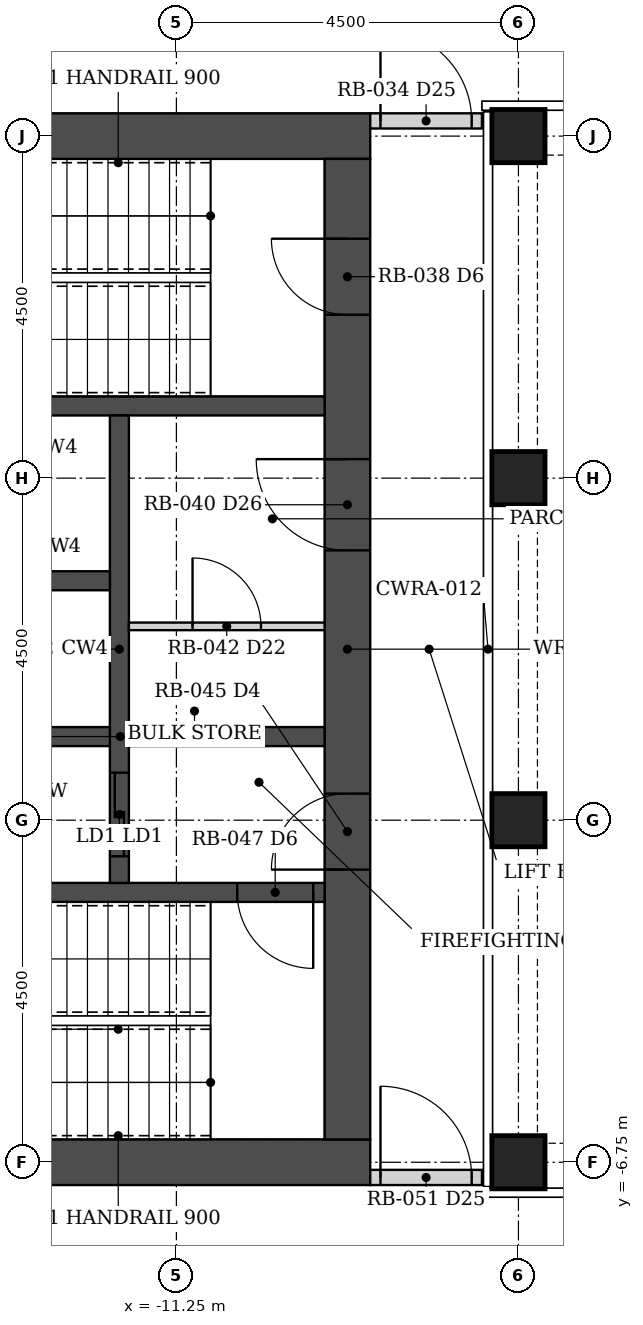
"""IFC4 building model, lengths in metres.
Left out: names, types, materials, properties, quantities, classifications, styles, units other than length and angle.
Written with IfcOpenShell. Run it as: python <this file> out.ifc"""

import sys

from ifc_helpers import new_model, si_unit, direction, frame, frame_2d, origin, origin_2d, place, context, subcontext, project, spatial, rectangle, hollow_rectangle, extrude, element, fill, save


model = new_model("IFC4")
c1 = context("Model", 3, precision=1e-05, world=origin(), true_north=direction((0.0, 1.0)))
c2 = subcontext(c1, "Body", "Model", "MODEL_VIEW")
j1 = project(units=[si_unit("LENGTHUNIT", "METRE"), si_unit("PLANEANGLEUNIT", "RADIAN")], contexts=[c1])
p1 = place(None, origin())
s1 = spatial("IfcSite", under=j1, at=p1, CompositionType="ELEMENT")
p2 = place(p1, origin())
s2 = spatial("IfcBuilding", under=s1, at=p2, CompositionType="ELEMENT")
p3 = place(p2, frame((0.0, 0.0, 37.0)))
s3 = spatial("IfcBuildingStorey", under=s2, at=p3, CompositionType="ELEMENT", Elevation=37.0)
for number, where, z_axis, x_axis in (
    (1, (-6.75, -6.75, 0.0), (0.0, 0.0, 1.0), (1.0, 0.0, 0.0)),
    (2, (-6.75, -2.25, 0.0), (0.0, 0.0, 1.0), (1.0, 0.0, 0.0)),
    (3, (-6.75, 2.25, 0.0), (0.0, 0.0, 1.0), (1.0, 0.0, 0.0)),
    (4, (-6.75, 6.75, 0.0), (0.0, 0.0, 1.0), (1.0, 0.0, 0.0)),
):
    element("IfcColumn", number, at=place(p3, frame(where, z_axis=z_axis, x_axis=x_axis)), inside=s3, PredefinedType="COLUMN", context=c2, shape_type="SweptSolid", body=[
        extrude(hollow_rectangle(XDim=0.7, YDim=0.7, WallThickness=0.07, at=origin_2d()), origin(), (0.0, 0.0, 1.0), 3.5),
    ])
for number, where, z_axis, x_axis in (
    (5, (-8.7, -6.75, 0.0), (0.0, 0.0, 1.0), (-1.0, 0.0, 0.0)),
    (6, (-8.7, 6.75, 0.0), (0.0, 0.0, 1.0), (-1.0, 0.0, 0.0)),
):
    element("IfcWall", number, at=place(p3, frame(where, z_axis=z_axis, x_axis=x_axis)), inside=s3, PredefinedType="SHEAR", context=c2, shape_type="SweptSolid", body=[
        extrude(rectangle(XDim=9.6, YDim=0.6, at=frame_2d((4.8, 0.0))), origin(), (0.0, 0.0, 1.0), 3.5),
    ])
p4 = place(p3, frame((-9.0, -6.45, 0.0), z_axis=(0.0, 0.0, 1.0), x_axis=(0.0, 1.0, 0.0)))
e7 = element("IfcWall", 7, at=p4, inside=s3, PredefinedType="SHEAR", context=c2, shape_type="SweptSolid", body=[
    extrude(rectangle(XDim=12.9, YDim=0.6, at=frame_2d((6.45, 0.0))), origin(), (0.0, 0.0, 1.0), 3.5),
])
p5 = place(p4, frame((3.55, 0.0, 0.0)))
e8 = element("IfcOpeningElement", 8, at=p5, cuts=e7, PredefinedType="OPENING", context=c2, shape_type="SweptSolid", body=[
    extrude(rectangle(XDim=1.0, YDim=2.1, at=frame_2d((0.5, 1.05))), frame((0.0, 0.31, 0.0), z_axis=(0.0, -1.0, 0.0), x_axis=(1.0, 0.0, 0.0)), (0.0, 0.0, 1.0), 0.62),
])
p6 = place(p4, frame((7.75, 0.0, 0.0)))
e9 = element("IfcOpeningElement", 9, at=p6, cuts=e7, PredefinedType="OPENING", context=c2, shape_type="SweptSolid", body=[
    extrude(rectangle(XDim=1.2, YDim=2.1, at=frame_2d((0.6, 1.05))), frame((0.0, 0.31, 0.0), z_axis=(0.0, -1.0, 0.0), x_axis=(1.0, 0.0, 0.0)), (0.0, 0.0, 1.0), 0.62),
])
p7 = place(p4, frame((10.85, 0.0, 0.0)))
e10 = element("IfcOpeningElement", 10, at=p7, cuts=e7, PredefinedType="OPENING", context=c2, shape_type="SweptSolid", body=[
    extrude(rectangle(XDim=1.0, YDim=2.1, at=frame_2d((0.5, 1.05))), frame((0.0, 0.31, 0.0), z_axis=(0.0, -1.0, 0.0), x_axis=(1.0, 0.0, 0.0)), (0.0, 0.0, 1.0), 0.62),
])
p8 = place(p3, frame((-9.3, -3.2, 0.0), z_axis=(0.0, 0.0, 1.0), x_axis=(-1.0, 0.0, 0.0)))
e11 = element("IfcWall", 11, at=p8, inside=s3, PredefinedType="SHEAR", context=c2, shape_type="SweptSolid", body=[
    extrude(rectangle(XDim=8.4, YDim=0.25, at=frame_2d((4.2, 0.0))), origin(), (0.0, 0.0, 1.0), 3.5),
])
p9 = place(p8, frame((0.15, 0.0, 0.0)))
e12 = element("IfcOpeningElement", 12, at=p9, cuts=e11, PredefinedType="OPENING", context=c2, shape_type="SweptSolid", body=[
    extrude(rectangle(XDim=1.0, YDim=2.1, at=frame_2d((0.5, 1.05))), frame((0.0, 0.135, 0.0), z_axis=(0.0, -1.0, 0.0), x_axis=(1.0, 0.0, 0.0)), (0.0, 0.0, 1.0), 0.27),
])
p10 = place(p3, frame((-9.3, 3.2, 0.0), z_axis=(0.0, 0.0, 1.0), x_axis=(-1.0, 0.0, 0.0)))
e13 = element("IfcWall", 13, at=p10, inside=s3, PredefinedType="SHEAR", context=c2, shape_type="SweptSolid", body=[
    extrude(rectangle(XDim=8.4, YDim=0.25, at=frame_2d((4.2, 0.0))), origin(), (0.0, 0.0, 1.0), 3.5),
])
p11 = place(p3, frame((-9.3, -1.15, 0.0), z_axis=(0.0, 0.0, 1.0), x_axis=(-1.0, 0.0, 0.0)))
e14 = element("IfcWall", 14, at=p11, inside=s3, PredefinedType="SHEAR", context=c2, shape_type="SweptSolid", body=[
    extrude(rectangle(XDim=5.375, YDim=0.25, at=frame_2d((2.688, 0.0))), origin(), (0.0, 0.0, 1.0), 3.5),
])
p12 = place(p3, frame((-12.0, -3.075, 0.0), z_axis=(0.0, 0.0, 1.0), x_axis=(0.0, 1.0, 0.0)))
e15 = element("IfcWall", 15, at=p12, inside=s3, PredefinedType="SHEAR", context=c2, shape_type="SweptSolid", body=[
    extrude(rectangle(XDim=6.15, YDim=0.25, at=frame_2d((3.075, 0.0))), origin(), (0.0, 0.0, 1.0), 3.5),
])
p13 = place(p12, frame((0.35, 0.0, 0.0)))
e16 = element("IfcOpeningElement", 16, at=p13, cuts=e15, PredefinedType="OPENING", context=c2, shape_type="SweptSolid", body=[
    extrude(rectangle(XDim=1.1, YDim=2.1, at=frame_2d((0.55, 1.05))), frame((0.0, 0.135, 0.0), z_axis=(0.0, -1.0, 0.0), x_axis=(1.0, 0.0, 0.0)), (0.0, 0.0, 1.0), 0.27),
])
p14 = place(p3, frame((-12.125, 0.9, 0.0), z_axis=(0.0, 0.0, 1.0), x_axis=(-1.0, 0.0, 0.0)))
e17 = element("IfcWall", 17, at=p14, inside=s3, PredefinedType="SHEAR", context=c2, shape_type="SweptSolid", body=[
    extrude(rectangle(XDim=2.55, YDim=0.25, at=frame_2d((1.275, 0.0))), origin(), (0.0, 0.0, 1.0), 3.5),
])
p15 = place(p3, frame((-8.7, 6.95, 0.0), z_axis=(0.0, 0.0, 1.0), x_axis=(1.0, 0.0, 0.0)))
e18 = element("IfcWall", 18, at=p15, inside=s3, PredefinedType="PARTITIONING", context=c2, shape_type="SweptSolid", body=[
    extrude(rectangle(XDim=1.47, YDim=0.2, at=frame_2d((0.735, 0.0))), origin(), (0.0, 0.0, 1.0), 2.373),
])
p16 = place(p15, frame((0.135, 0.0, 0.0)))
e19 = element("IfcOpeningElement", 19, at=p16, cuts=e18, PredefinedType="OPENING", context=c2, shape_type="SweptSolid", body=[
    extrude(rectangle(XDim=1.2, YDim=2.1, at=frame_2d((0.6, 1.05))), frame((0.0, 0.11, 0.0), z_axis=(0.0, -1.0, 0.0), x_axis=(1.0, 0.0, 0.0)), (0.0, 0.0, 1.0), 0.22),
])
p17 = place(p3, frame((-8.7, -6.95, 0.0), z_axis=(0.0, 0.0, 1.0), x_axis=(1.0, 0.0, 0.0)))
e20 = element("IfcWall", 20, at=p17, inside=s3, PredefinedType="PARTITIONING", context=c2, shape_type="SweptSolid", body=[
    extrude(rectangle(XDim=1.47, YDim=0.2, at=frame_2d((0.735, 0.0))), origin(), (0.0, 0.0, 1.0), 2.373),
])
p18 = place(p17, frame((0.135, 0.0, 0.0)))
e21 = element("IfcOpeningElement", 21, at=p18, cuts=e20, PredefinedType="OPENING", context=c2, shape_type="SweptSolid", body=[
    extrude(rectangle(XDim=1.2, YDim=2.1, at=frame_2d((0.6, 1.05))), frame((0.0, 0.11, 0.0), z_axis=(0.0, -1.0, 0.0), x_axis=(1.0, 0.0, 0.0)), (0.0, 0.0, 1.0), 0.22),
])
p19 = place(p3, frame((-11.875, 0.3, 0.0), z_axis=(0.0, 0.0, 1.0), x_axis=(1.0, 0.0, 0.0)))
e22 = element("IfcWall", 22, at=p19, inside=s3, PredefinedType="PARTITIONING", context=c2, shape_type="SweptSolid", body=[
    extrude(rectangle(XDim=2.575, YDim=0.1, at=frame_2d((1.288, 0.0))), origin(), (0.0, 0.0, 1.0), 2.373),
])
p20 = place(p19, frame((0.837, 0.0, 0.0)))
e23 = element("IfcOpeningElement", 23, at=p20, cuts=e22, PredefinedType="OPENING", context=c2, shape_type="SweptSolid", body=[
    extrude(rectangle(XDim=0.9, YDim=2.1, at=frame_2d((0.45, 1.05))), frame((0.0, 0.06, 0.0), z_axis=(0.0, -1.0, 0.0), x_axis=(1.0, 0.0, 0.0)), (0.0, 0.0, 1.0), 0.12),
])
p21 = place(p16, origin())
e24 = element("IfcDoor", 24, at=p21, inside=s3, OperationType="DOUBLE_DOOR_DOUBLE_SWING", PredefinedType="DOOR", context=c2, shape_type="SweptSolid", body=[
    extrude(rectangle(XDim=1.2, YDim=2.1, at=frame_2d((0.6, 1.05))), frame((0.0, 0.025, 0.0), z_axis=(0.0, -1.0, 0.0), x_axis=(1.0, 0.0, 0.0)), (0.0, 0.0, 1.0), 0.05),
])
fill(e19, e24)
p22 = place(p18, origin())
e25 = element("IfcDoor", 25, at=p22, inside=s3, OperationType="DOUBLE_DOOR_DOUBLE_SWING", PredefinedType="DOOR", context=c2, shape_type="SweptSolid", body=[
    extrude(rectangle(XDim=1.2, YDim=2.1, at=frame_2d((0.6, 1.05))), frame((0.0, 0.025, 0.0), z_axis=(0.0, -1.0, 0.0), x_axis=(1.0, 0.0, 0.0)), (0.0, 0.0, 1.0), 0.05),
])
fill(e21, e25)
p23 = place(p5, origin())
e26 = element("IfcDoor", 26, at=p23, inside=s3, OperationType="SINGLE_SWING_LEFT", PredefinedType="DOOR", context=c2, shape_type="SweptSolid", body=[
    extrude(rectangle(XDim=1.0, YDim=2.1, at=frame_2d((0.5, 1.05))), frame((0.0, 0.025, 0.0), z_axis=(0.0, -1.0, 0.0), x_axis=(1.0, 0.0, 0.0)), (0.0, 0.0, 1.0), 0.05),
])
fill(e8, e26)
p24 = place(p9, origin())
e27 = element("IfcDoor", 27, at=p24, inside=s3, OperationType="SINGLE_SWING_LEFT", PredefinedType="DOOR", context=c2, shape_type="SweptSolid", body=[
    extrude(rectangle(XDim=1.0, YDim=2.1, at=frame_2d((0.5, 1.05))), frame((0.0, 0.025, 0.0), z_axis=(0.0, -1.0, 0.0), x_axis=(1.0, 0.0, 0.0)), (0.0, 0.0, 1.0), 0.05),
])
fill(e12, e27)
p25 = place(p6, origin())
e28 = element("IfcDoor", 28, at=p25, inside=s3, OperationType="SINGLE_SWING_RIGHT", PredefinedType="DOOR", context=c2, shape_type="SweptSolid", body=[
    extrude(rectangle(XDim=1.2, YDim=2.1, at=frame_2d((0.6, 1.05))), frame((0.0, 0.025, 0.0), z_axis=(0.0, -1.0, 0.0), x_axis=(1.0, 0.0, 0.0)), (0.0, 0.0, 1.0), 0.05),
])
fill(e9, e28)
p26 = place(p20, origin())
e29 = element("IfcDoor", 29, at=p26, inside=s3, OperationType="SINGLE_SWING_LEFT", PredefinedType="DOOR", context=c2, shape_type="SweptSolid", body=[
    extrude(rectangle(XDim=0.9, YDim=2.1, at=frame_2d((0.45, 1.05))), frame((0.0, 0.025, 0.0), z_axis=(0.0, -1.0, 0.0), x_axis=(1.0, 0.0, 0.0)), (0.0, 0.0, 1.0), 0.05),
])
fill(e23, e29)
p27 = place(p7, origin())
e30 = element("IfcDoor", 30, at=p27, inside=s3, OperationType="SINGLE_SWING_RIGHT", PredefinedType="DOOR", context=c2, shape_type="SweptSolid", body=[
    extrude(rectangle(XDim=1.0, YDim=2.1, at=frame_2d((0.5, 1.05))), frame((0.0, 0.025, 0.0), z_axis=(0.0, -1.0, 0.0), x_axis=(1.0, 0.0, 0.0)), (0.0, 0.0, 1.0), 0.05),
])
fill(e10, e30)
p28 = place(p13, origin())
e31 = element("IfcDoor", 31, at=p28, inside=s3, OperationType="DOUBLE_DOOR_SLIDING", PredefinedType="DOOR", context=c2, shape_type="SweptSolid", body=[
    extrude(rectangle(XDim=1.1, YDim=2.1, at=frame_2d((0.55, 1.05))), frame((0.0, 0.025, 0.0), z_axis=(0.0, -1.0, 0.0), x_axis=(1.0, 0.0, 0.0)), (0.0, 0.0, 1.0), 0.05),
])
fill(e16, e31)
save(model, sys.argv[1])
